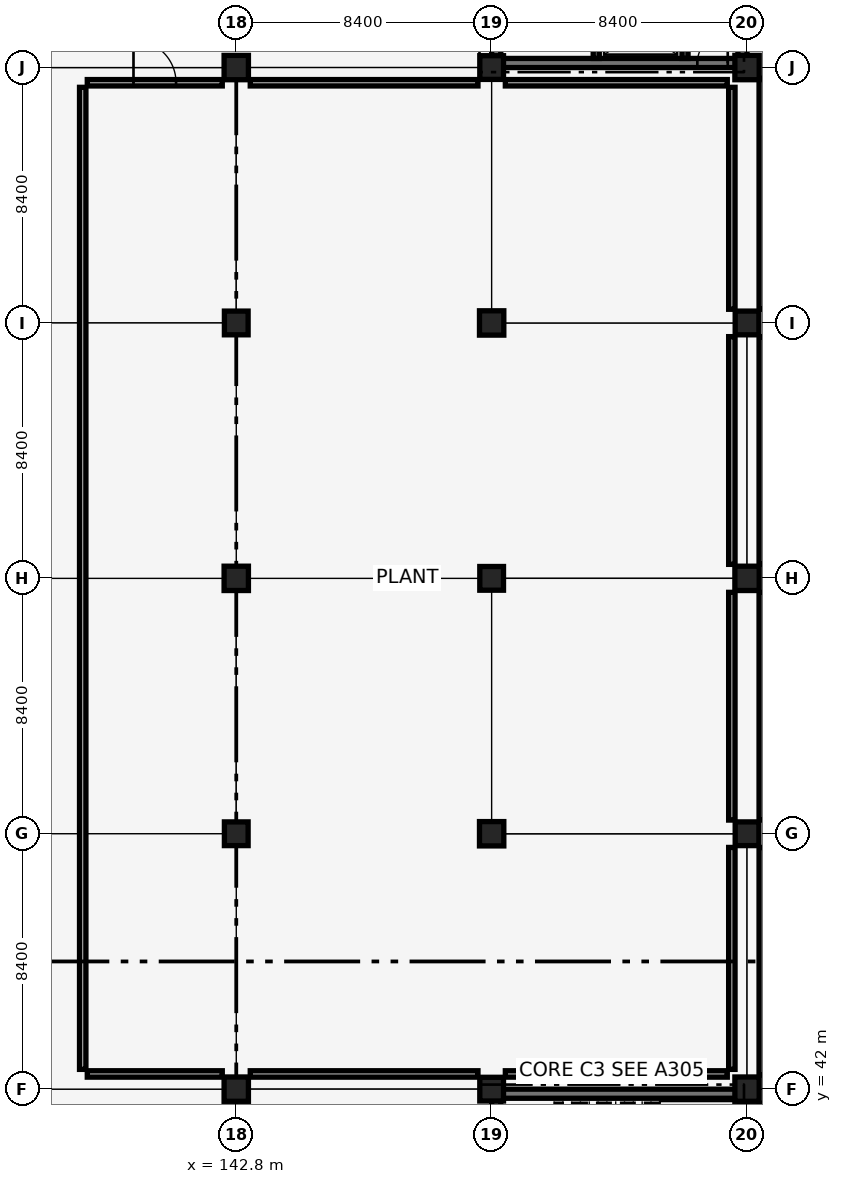
"""IFC4 building model, lengths in metres.
Left out: names, types, materials, properties, quantities, classifications, styles, units other than length and angle.
Written with IfcOpenShell. Run it as: python <this file> out.ifc"""

import sys

from ifc_helpers import new_model, si_unit, direction, frame, frame_2d, origin, origin_2d, place, context, subcontext, project, spatial, rectangle, extrude, element, fill, save


model = new_model("IFC4")
c1 = context("Model", 3, precision=1e-05, world=origin(), true_north=direction((0.0, 1.0)))
c2 = subcontext(c1, "Body", "Model", "MODEL_VIEW")
j1 = project(units=[si_unit("LENGTHUNIT", "METRE"), si_unit("PLANEANGLEUNIT", "RADIAN")], contexts=[c1])
p1 = place(None, origin())
s1 = spatial("IfcSite", under=j1, at=p1, CompositionType="ELEMENT")
p2 = place(p1, origin())
s2 = spatial("IfcBuilding", under=s1, at=p2, CompositionType="ELEMENT")
p3 = place(p2, frame((0.0, 0.0, -4.42)))
s3 = spatial("IfcBuildingStorey", under=s2, at=p3, CompositionType="ELEMENT", Elevation=-4.42)
p4 = place(p3, frame((151.35, 41.85, 0.0), z_axis=(0.0, 0.0, 1.0), x_axis=(1.0, 0.0, 0.0)))
e1 = element("IfcWall", 1, at=p4, inside=s3, PredefinedType="SHEAR", context=c2, shape_type="SweptSolid", body=[
    extrude(rectangle(XDim=8.1, YDim=0.3, at=frame_2d((4.05, 0.0))), origin(), (0.0, 0.0, 1.0), 4.12),
])
p5 = place(p3, frame((151.35, 33.75, 0.0), z_axis=(0.0, 0.0, 1.0), x_axis=(0.0, 1.0, 0.0)))
e2 = element("IfcWall", 2, at=p5, inside=s3, PredefinedType="SHEAR", context=c2, shape_type="SweptSolid", body=[
    extrude(rectangle(XDim=8.1, YDim=0.3, at=frame_2d((4.05, 0.0))), origin(), (0.0, 0.0, 1.0), 4.12),
])
p6 = place(p5, frame((1.325, 0.0, 0.0)))
e3 = element("IfcOpeningElement", 3, at=p6, cuts=e2, PredefinedType="OPENING", context=c2, shape_type="SweptSolid", body=[
    extrude(rectangle(XDim=1.45, YDim=2.15, at=frame_2d((0.725, 1.075))), frame((0.0, 0.16, 0.0), z_axis=(0.0, -1.0, 0.0), x_axis=(1.0, 0.0, 0.0)), (0.0, 0.0, 1.0), 0.32),
])
p7 = place(p3, frame((159.45, 33.75, 0.0), z_axis=(0.0, 0.0, 1.0), x_axis=(0.0, 1.0, 0.0)))
e4 = element("IfcWall", 4, at=p7, inside=s3, PredefinedType="SHEAR", context=c2, shape_type="SweptSolid", body=[
    extrude(rectangle(XDim=8.1, YDim=0.3, at=frame_2d((4.05, 0.0))), origin(), (0.0, 0.0, 1.0), 4.12),
])
p8 = place(p3, frame((151.35, 75.75, 0.0), z_axis=(0.0, 0.0, 1.0), x_axis=(1.0, 0.0, 0.0)))
e5 = element("IfcWall", 5, at=p8, inside=s3, PredefinedType="SHEAR", context=c2, shape_type="SweptSolid", body=[
    extrude(rectangle(XDim=8.1, YDim=0.3, at=frame_2d((4.05, 0.0))), origin(), (0.0, 0.0, 1.0), 4.12),
])
p9 = place(p8, frame((6.615, 0.0, 0.0)))
e6 = element("IfcOpeningElement", 6, at=p9, cuts=e5, PredefinedType="OPENING", context=c2, shape_type="SweptSolid", body=[
    extrude(rectangle(XDim=1.0, YDim=2.15, at=frame_2d((0.5, 1.075))), frame((0.0, 0.16, 0.0), z_axis=(0.0, -1.0, 0.0), x_axis=(1.0, 0.0, 0.0)), (0.0, 0.0, 1.0), 0.32),
])
p10 = place(p3, frame((151.35, 75.75, 0.0), z_axis=(0.0, 0.0, 1.0), x_axis=(0.0, 1.0, 0.0)))
e7 = element("IfcWall", 7, at=p10, inside=s3, PredefinedType="SHEAR", context=c2, shape_type="SweptSolid", body=[
    extrude(rectangle(XDim=8.1, YDim=0.3, at=frame_2d((4.05, 0.0))), origin(), (0.0, 0.0, 1.0), 4.12),
])
p11 = place(p10, frame((1.325, 0.0, 0.0)))
e8 = element("IfcOpeningElement", 8, at=p11, cuts=e7, PredefinedType="OPENING", context=c2, shape_type="SweptSolid", body=[
    extrude(rectangle(XDim=1.45, YDim=2.15, at=frame_2d((0.725, 1.075))), frame((0.0, 0.16, 0.0), z_axis=(0.0, -1.0, 0.0), x_axis=(1.0, 0.0, 0.0)), (0.0, 0.0, 1.0), 0.32),
])
p12 = place(p3, frame((159.45, 75.75, 0.0), z_axis=(0.0, 0.0, 1.0), x_axis=(0.0, 1.0, 0.0)))
e9 = element("IfcWall", 9, at=p12, inside=s3, PredefinedType="SHEAR", context=c2, shape_type="SweptSolid", body=[
    extrude(rectangle(XDim=8.1, YDim=0.3, at=frame_2d((4.05, 0.0))), origin(), (0.0, 0.0, 1.0), 4.12),
])
p13 = place(p3, frame((142.8, 42.0, -0.4), z_axis=(0.0, 0.0, 1.0), x_axis=(1.0, 0.0, 0.0)))
e10 = element("IfcColumn", 10, at=p13, inside=s3, PredefinedType="COLUMN", context=c2, shape_type="SweptSolid", body=[
    extrude(rectangle(XDim=0.8, YDim=0.8, at=origin_2d()), origin(), (0.0, 0.0, 1.0), 4.52),
])
p14 = place(p3, frame((142.8, 50.4, -0.4), z_axis=(0.0, 0.0, 1.0), x_axis=(1.0, 0.0, 0.0)))
e11 = element("IfcColumn", 11, at=p14, inside=s3, PredefinedType="COLUMN", context=c2, shape_type="SweptSolid", body=[
    extrude(rectangle(XDim=0.78, YDim=0.78, at=origin_2d()), origin(), (0.0, 0.0, 1.0), 4.52),
])
p15 = place(p3, frame((142.8, 58.8, -0.4), z_axis=(0.0, 0.0, 1.0), x_axis=(1.0, 0.0, 0.0)))
e12 = element("IfcColumn", 12, at=p15, inside=s3, PredefinedType="COLUMN", context=c2, shape_type="SweptSolid", body=[
    extrude(rectangle(XDim=0.8, YDim=0.8, at=origin_2d()), origin(), (0.0, 0.0, 1.0), 4.52),
])
p16 = place(p3, frame((142.8, 67.2, -0.4), z_axis=(0.0, 0.0, 1.0), x_axis=(1.0, 0.0, 0.0)))
e13 = element("IfcColumn", 13, at=p16, inside=s3, PredefinedType="COLUMN", context=c2, shape_type="SweptSolid", body=[
    extrude(rectangle(XDim=0.78, YDim=0.78, at=origin_2d()), origin(), (0.0, 0.0, 1.0), 4.52),
])
p17 = place(p3, frame((142.8, 75.6, -0.4), z_axis=(0.0, 0.0, 1.0), x_axis=(1.0, 0.0, 0.0)))
e14 = element("IfcColumn", 14, at=p17, inside=s3, PredefinedType="COLUMN", context=c2, shape_type="SweptSolid", body=[
    extrude(rectangle(XDim=0.8, YDim=0.8, at=origin_2d()), origin(), (0.0, 0.0, 1.0), 4.52),
])
p18 = place(p3, frame((151.2, 42.0, -0.4), z_axis=(0.0, 0.0, 1.0), x_axis=(1.0, 0.0, 0.0)))
e15 = element("IfcColumn", 15, at=p18, inside=s3, PredefinedType="COLUMN", context=c2, shape_type="SweptSolid", body=[
    extrude(rectangle(XDim=0.78, YDim=0.78, at=origin_2d()), origin(), (0.0, 0.0, 1.0), 4.52),
])
p19 = place(p3, frame((151.2, 50.4, -0.4), z_axis=(0.0, 0.0, 1.0), x_axis=(1.0, 0.0, 0.0)))
e16 = element("IfcColumn", 16, at=p19, inside=s3, PredefinedType="COLUMN", context=c2, shape_type="SweptSolid", body=[
    extrude(rectangle(XDim=0.8, YDim=0.8, at=origin_2d()), origin(), (0.0, 0.0, 1.0), 4.52),
])
p20 = place(p3, frame((151.2, 58.8, -0.4), z_axis=(0.0, 0.0, 1.0), x_axis=(1.0, 0.0, 0.0)))
e17 = element("IfcColumn", 17, at=p20, inside=s3, PredefinedType="COLUMN", context=c2, shape_type="SweptSolid", body=[
    extrude(rectangle(XDim=0.78, YDim=0.78, at=origin_2d()), origin(), (0.0, 0.0, 1.0), 4.52),
])
p21 = place(p3, frame((151.2, 67.2, -0.4), z_axis=(0.0, 0.0, 1.0), x_axis=(1.0, 0.0, 0.0)))
e18 = element("IfcColumn", 18, at=p21, inside=s3, PredefinedType="COLUMN", context=c2, shape_type="SweptSolid", body=[
    extrude(rectangle(XDim=0.8, YDim=0.8, at=origin_2d()), origin(), (0.0, 0.0, 1.0), 4.52),
])
p22 = place(p3, frame((151.2, 75.6, -0.4), z_axis=(0.0, 0.0, 1.0), x_axis=(1.0, 0.0, 0.0)))
e19 = element("IfcColumn", 19, at=p22, inside=s3, PredefinedType="COLUMN", context=c2, shape_type="SweptSolid", body=[
    extrude(rectangle(XDim=0.78, YDim=0.78, at=origin_2d()), origin(), (0.0, 0.0, 1.0), 4.52),
])
p23 = place(p3, frame((159.6, 42.0, -0.4), z_axis=(0.0, 0.0, 1.0), x_axis=(1.0, 0.0, 0.0)))
e20 = element("IfcColumn", 20, at=p23, inside=s3, PredefinedType="COLUMN", context=c2, shape_type="SweptSolid", body=[
    extrude(rectangle(XDim=0.8, YDim=0.8, at=origin_2d()), origin(), (0.0, 0.0, 1.0), 4.52),
])
p24 = place(p3, frame((159.6, 50.4, -0.4), z_axis=(0.0, 0.0, 1.0), x_axis=(1.0, 0.0, 0.0)))
e21 = element("IfcColumn", 21, at=p24, inside=s3, PredefinedType="COLUMN", context=c2, shape_type="SweptSolid", body=[
    extrude(rectangle(XDim=0.78, YDim=0.78, at=origin_2d()), origin(), (0.0, 0.0, 1.0), 4.52),
])
p25 = place(p3, frame((159.6, 58.8, -0.4), z_axis=(0.0, 0.0, 1.0), x_axis=(1.0, 0.0, 0.0)))
e22 = element("IfcColumn", 22, at=p25, inside=s3, PredefinedType="COLUMN", context=c2, shape_type="SweptSolid", body=[
    extrude(rectangle(XDim=0.8, YDim=0.8, at=origin_2d()), origin(), (0.0, 0.0, 1.0), 4.52),
])
p26 = place(p3, frame((159.6, 67.2, -0.4), z_axis=(0.0, 0.0, 1.0), x_axis=(1.0, 0.0, 0.0)))
e23 = element("IfcColumn", 23, at=p26, inside=s3, PredefinedType="COLUMN", context=c2, shape_type="SweptSolid", body=[
    extrude(rectangle(XDim=0.78, YDim=0.78, at=origin_2d()), origin(), (0.0, 0.0, 1.0), 4.52),
])
p27 = place(p3, frame((159.6, 75.6, -0.4), z_axis=(0.0, 0.0, 1.0), x_axis=(1.0, 0.0, 0.0)))
e24 = element("IfcColumn", 24, at=p27, inside=s3, PredefinedType="COLUMN", context=c2, shape_type="SweptSolid", body=[
    extrude(rectangle(XDim=0.8, YDim=0.8, at=origin_2d()), origin(), (0.0, 0.0, 1.0), 4.52),
])
p28 = place(p3, frame((154.64, 75.9, 0.0), z_axis=(0.0, 0.0, 1.0), x_axis=(0.0, 1.0, 0.0)))
e25 = element("IfcWall", 25, at=p28, inside=s3, PredefinedType="SHEAR", context=c2, shape_type="SweptSolid", body=[
    extrude(rectangle(XDim=3.8, YDim=0.2, at=frame_2d((1.9, 0.0))), origin(), (0.0, 0.0, 1.0), 3.17),
])
p29 = place(p28, frame((0.375, 0.0, 0.0)))
e26 = element("IfcOpeningElement", 26, at=p29, cuts=e25, PredefinedType="OPENING", context=c2, shape_type="SweptSolid", body=[
    extrude(rectangle(XDim=1.1, YDim=2.15, at=frame_2d((0.55, 1.075))), frame((0.0, 0.11, 0.0), z_axis=(0.0, -1.0, 0.0), x_axis=(1.0, 0.0, 0.0)), (0.0, 0.0, 1.0), 0.22),
])
p30 = place(p28, frame((2.325, 0.0, 0.0)))
e27 = element("IfcOpeningElement", 27, at=p30, cuts=e25, PredefinedType="OPENING", context=c2, shape_type="SweptSolid", body=[
    extrude(rectangle(XDim=1.1, YDim=2.15, at=frame_2d((0.55, 1.075))), frame((0.0, 0.11, 0.0), z_axis=(0.0, -1.0, 0.0), x_axis=(1.0, 0.0, 0.0)), (0.0, 0.0, 1.0), 0.22),
])
p31 = place(p3, frame((157.56, 75.9, 0.0), z_axis=(0.0, 0.0, 1.0), x_axis=(0.0, 1.0, 0.0)))
e28 = element("IfcWall", 28, at=p31, inside=s3, PredefinedType="SHEAR", context=c2, shape_type="SweptSolid", body=[
    extrude(rectangle(XDim=3.8, YDim=0.2, at=frame_2d((1.9, 0.0))), origin(), (0.0, 0.0, 1.0), 3.17),
])
p32 = place(p3, frame((160.1, 34.25, 0.0), z_axis=(0.0, 0.0, 1.0), x_axis=(0.0, 1.0, 0.0)))
e29 = element("IfcWall", 29, at=p32, inside=s3, PredefinedType="PARTITIONING", context=c2, shape_type="SweptSolid", body=[
    extrude(rectangle(XDim=7.29, YDim=0.21, at=frame_2d((3.645, 0.0))), origin(), (0.0, 0.0, 1.0), 3.56),
])
p33 = place(p3, frame((160.1, 42.46, 0.0), z_axis=(0.0, 0.0, 1.0), x_axis=(0.0, 1.0, 0.0)))
e30 = element("IfcWall", 30, at=p33, inside=s3, PredefinedType="PARTITIONING", context=c2, shape_type="SweptSolid", body=[
    extrude(rectangle(XDim=7.49, YDim=0.21, at=frame_2d((3.745, 0.0))), origin(), (0.0, 0.0, 1.0), 3.57),
])
p34 = place(p3, frame((160.1, 50.85, 0.0), z_axis=(0.0, 0.0, 1.0), x_axis=(0.0, 1.0, 0.0)))
e31 = element("IfcWall", 31, at=p34, inside=s3, PredefinedType="PARTITIONING", context=c2, shape_type="SweptSolid", body=[
    extrude(rectangle(XDim=7.49, YDim=0.21, at=frame_2d((3.745, 0.0))), origin(), (0.0, 0.0, 1.0), 3.56),
])
p35 = place(p3, frame((160.1, 59.26, 0.0), z_axis=(0.0, 0.0, 1.0), x_axis=(0.0, 1.0, 0.0)))
e32 = element("IfcWall", 32, at=p35, inside=s3, PredefinedType="PARTITIONING", context=c2, shape_type="SweptSolid", body=[
    extrude(rectangle(XDim=7.49, YDim=0.21, at=frame_2d((3.745, 0.0))), origin(), (0.0, 0.0, 1.0), 3.57),
])
p36 = place(p3, frame((160.1, 67.65, 0.0), z_axis=(0.0, 0.0, 1.0), x_axis=(0.0, 1.0, 0.0)))
e33 = element("IfcWall", 33, at=p36, inside=s3, PredefinedType="PARTITIONING", context=c2, shape_type="SweptSolid", body=[
    extrude(rectangle(XDim=7.6, YDim=0.21, at=frame_2d((3.8, 0.0))), origin(), (0.0, 0.0, 1.0), 3.17),
])
p37 = place(p3, frame((137.9, 75.1, 0.0), z_axis=(0.0, 0.0, 1.0), x_axis=(1.0, 0.0, 0.0)))
e34 = element("IfcWall", 34, at=p37, inside=s3, PredefinedType="PARTITIONING", context=c2, shape_type="SweptSolid", body=[
    extrude(rectangle(XDim=4.44, YDim=0.21, at=frame_2d((2.22, 0.0))), origin(), (0.0, 0.0, 1.0), 4.12),
])
p38 = place(p37, frame((1.52, 0.0, 0.0)))
e35 = element("IfcOpeningElement", 35, at=p38, cuts=e34, PredefinedType="OPENING", context=c2, shape_type="SweptSolid", body=[
    extrude(rectangle(XDim=1.4, YDim=2.2, at=frame_2d((0.7, 1.1))), frame((0.0, 0.115, 0.0), z_axis=(0.0, -1.0, 0.0), x_axis=(1.0, 0.0, 0.0)), (0.0, 0.0, 1.0), 0.23),
])
p39 = place(p3, frame((143.26, 75.1, 0.0), z_axis=(0.0, 0.0, 1.0), x_axis=(1.0, 0.0, 0.0)))
e36 = element("IfcWall", 36, at=p39, inside=s3, PredefinedType="PARTITIONING", context=c2, shape_type="SweptSolid", body=[
    extrude(rectangle(XDim=7.49, YDim=0.21, at=frame_2d((3.745, 0.0))), origin(), (0.0, 0.0, 1.0), 4.12),
])
p40 = place(p3, frame((151.65, 75.1, 0.0), z_axis=(0.0, 0.0, 1.0), x_axis=(1.0, 0.0, 0.0)))
e37 = element("IfcWall", 37, at=p40, inside=s3, PredefinedType="PARTITIONING", context=c2, shape_type="SweptSolid", body=[
    extrude(rectangle(XDim=7.3, YDim=0.21, at=frame_2d((3.65, 0.0))), origin(), (0.0, 0.0, 1.0), 4.12),
])
p41 = place(p3, frame((137.75, 42.65, 0.0), z_axis=(0.0, 0.0, 1.0), x_axis=(0.0, 1.0, 0.0)))
e38 = element("IfcWall", 38, at=p41, inside=s3, PredefinedType="PARTITIONING", context=c2, shape_type="SweptSolid", body=[
    extrude(rectangle(XDim=32.3, YDim=0.21, at=frame_2d((16.15, 0.0))), origin(), (0.0, 0.0, 1.0), 3.17),
])
p42 = place(p3, frame((137.9, 42.5, 0.0), z_axis=(0.0, 0.0, 1.0), x_axis=(1.0, 0.0, 0.0)))
e39 = element("IfcWall", 39, at=p42, inside=s3, PredefinedType="PARTITIONING", context=c2, shape_type="SweptSolid", body=[
    extrude(rectangle(XDim=4.44, YDim=0.21, at=frame_2d((2.22, 0.0))), origin(), (0.0, 0.0, 1.0), 4.12),
])
p43 = place(p3, frame((143.26, 42.5, 0.0), z_axis=(0.0, 0.0, 1.0), x_axis=(1.0, 0.0, 0.0)))
e40 = element("IfcWall", 40, at=p43, inside=s3, PredefinedType="PARTITIONING", context=c2, shape_type="SweptSolid", body=[
    extrude(rectangle(XDim=7.49, YDim=0.21, at=frame_2d((3.745, 0.0))), origin(), (0.0, 0.0, 1.0), 4.12),
])
p44 = place(p3, frame((151.65, 42.5, 0.0), z_axis=(0.0, 0.0, 1.0), x_axis=(1.0, 0.0, 0.0)))
e41 = element("IfcWall", 41, at=p44, inside=s3, PredefinedType="PARTITIONING", context=c2, shape_type="SweptSolid", body=[
    extrude(rectangle(XDim=7.3, YDim=0.21, at=frame_2d((3.65, 0.0))), origin(), (0.0, 0.0, 1.0), 4.12),
])
p45 = place(p3, frame((159.1, 42.65, 0.0), z_axis=(0.0, 0.0, 1.0), x_axis=(0.0, 1.0, 0.0)))
e42 = element("IfcWall", 42, at=p45, inside=s3, PredefinedType="PARTITIONING", context=c2, shape_type="SweptSolid", body=[
    extrude(rectangle(XDim=7.3, YDim=0.21, at=frame_2d((3.65, 0.0))), origin(), (0.0, 0.0, 1.0), 3.56),
])
p46 = place(p3, frame((159.1, 50.85, 0.0), z_axis=(0.0, 0.0, 1.0), x_axis=(0.0, 1.0, 0.0)))
e43 = element("IfcWall", 43, at=p46, inside=s3, PredefinedType="PARTITIONING", context=c2, shape_type="SweptSolid", body=[
    extrude(rectangle(XDim=7.49, YDim=0.21, at=frame_2d((3.745, 0.0))), origin(), (0.0, 0.0, 1.0), 3.57),
])
p47 = place(p3, frame((159.1, 59.26, 0.0), z_axis=(0.0, 0.0, 1.0), x_axis=(0.0, 1.0, 0.0)))
e44 = element("IfcWall", 44, at=p47, inside=s3, PredefinedType="PARTITIONING", context=c2, shape_type="SweptSolid", body=[
    extrude(rectangle(XDim=7.49, YDim=0.21, at=frame_2d((3.745, 0.0))), origin(), (0.0, 0.0, 1.0), 3.56),
])
p48 = place(p3, frame((159.1, 67.65, 0.0), z_axis=(0.0, 0.0, 1.0), x_axis=(0.0, 1.0, 0.0)))
e45 = element("IfcWall", 45, at=p48, inside=s3, PredefinedType="PARTITIONING", context=c2, shape_type="SweptSolid", body=[
    extrude(rectangle(XDim=7.3, YDim=0.21, at=frame_2d((3.65, 0.0))), origin(), (0.0, 0.0, 1.0), 3.57),
])
p49 = place(p9, origin())
e46 = element("IfcDoor", 46, at=p49, inside=s3, OperationType="SINGLE_SWING_RIGHT", PredefinedType="DOOR", context=c2, shape_type="SweptSolid", body=[
    extrude(rectangle(XDim=1.0, YDim=2.15, at=frame_2d((0.5, 1.075))), frame((0.0, 0.025, 0.0), z_axis=(0.0, -1.0, 0.0), x_axis=(1.0, 0.0, 0.0)), (0.0, 0.0, 1.0), 0.05),
])
fill(e6, e46)
p50 = place(p38, origin())
e47 = element("IfcDoor", 47, at=p50, inside=s3, OperationType="DOUBLE_DOOR_SINGLE_SWING", PredefinedType="DOOR", context=c2, shape_type="SweptSolid", body=[
    extrude(rectangle(XDim=1.4, YDim=2.2, at=frame_2d((0.7, 1.1))), frame((0.0, 0.025, 0.0), z_axis=(0.0, -1.0, 0.0), x_axis=(1.0, 0.0, 0.0)), (0.0, 0.0, 1.0), 0.05),
])
fill(e35, e47)
save(model, sys.argv[1])
